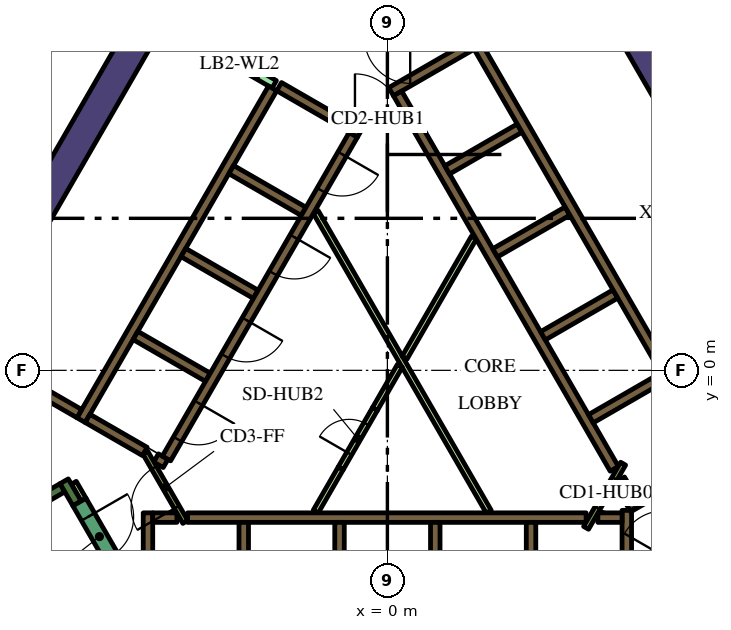
"""IFC4 building model, lengths in metres.
Left out: names, types, materials, properties, quantities, classifications, styles, units other than length and angle.
Written with IfcOpenShell. Run it as: python <this file> out.ifc"""

import sys

from ifc_helpers import new_model, si_unit, direction, frame, frame_2d, origin, place, context, subcontext, project, spatial, polyline, rectangle, outline, extrude, element, fill, save


model = new_model("IFC4")
c1 = context("Model", 3, precision=1e-05, world=origin(), true_north=direction((0.0, 1.0)))
c2 = subcontext(c1, "Body", "Model", "MODEL_VIEW")
j1 = project(units=[si_unit("LENGTHUNIT", "METRE"), si_unit("PLANEANGLEUNIT", "RADIAN")], contexts=[c1])
p1 = place(None, origin())
s1 = spatial("IfcSite", under=j1, at=p1, CompositionType="ELEMENT")
p2 = place(p1, origin())
s2 = spatial("IfcBuilding", under=s1, at=p2, CompositionType="ELEMENT")
p3 = place(p2, frame((0.0, 0.0, 192.0)))
s3 = spatial("IfcBuildingStorey", under=s2, at=p3, CompositionType="ELEMENT", Elevation=192.0)
p4 = place(p3, frame((8.279, 5.761, 0.0), z_axis=(0.0, 0.0, 1.0), x_axis=(-0.500010359015, 0.866019422922, 0.0)))
e1 = element("IfcWall", 1, at=p4, inside=s3, PredefinedType="SOLIDWALL", context=c2, shape_type="SweptSolid", body=[
    extrude(rectangle(XDim=12.528, YDim=0.8, at=frame_2d((6.264, 0.0))), origin(), (0.0, 0.0, 1.0), 4.2),
])
p5 = place(p3, frame((-4.321, 12.616, 0.0), z_axis=(0.0, 0.0, 1.0), x_axis=(-0.500009809857, -0.866019739987, 0.0)))
e2 = element("IfcWall", 2, at=p5, inside=s3, PredefinedType="SOLIDWALL", context=c2, shape_type="SweptSolid", body=[
    extrude(rectangle(XDim=16.695, YDim=0.8, at=frame_2d((8.347, 0.0))), origin(), (0.0, 0.0, 1.0), 4.2),
])
p6 = place(p3, frame((-14.44, -6.49, 0.0), z_axis=(0.0, 0.0, 1.0), x_axis=(0.866022966069, 0.500004222222, 0.0)))
e3 = element("IfcWall", 3, at=p6, inside=s3, PredefinedType="SOLIDWALL", context=c2, shape_type="SweptSolid", body=[
    extrude(rectangle(XDim=6.8, YDim=0.25, at=frame_2d((3.4, 0.0))), origin(), (0.0, 0.0, 1.0), 4.2),
])
p7 = place(p3, frame((-8.168, -3.503, 0.0), z_axis=(0.0, 0.0, 1.0), x_axis=(-0.499952099219, 0.866053057547, 0.0)))
e4 = element("IfcWall", 4, at=p7, inside=s3, PredefinedType="SOLIDWALL", context=c2, shape_type="SweptSolid", body=[
    extrude(rectangle(XDim=0.675, YDim=0.25, at=frame_2d((0.337, 0.0))), origin(), (0.0, 0.0, 1.0), 4.2),
])
p8 = place(p3, frame((-5.259, -3.875, 0.0), z_axis=(0.0, 0.0, 1.0), x_axis=(1.0, 0.0, 0.0)))
e5 = element("IfcWall", 5, at=p8, inside=s3, PredefinedType="SOLIDWALL", context=c2, shape_type="SweptSolid", body=[
    extrude(rectangle(XDim=10.489, YDim=0.25, at=frame_2d((5.244, 0.0))), origin(), (0.0, 0.0, 1.0), 4.2),
])
for number, where, z_axis, x_axis in (
    (6, (3.78, -4.0, 0.0), (0.0, 0.0, 1.0), (0.0, -1.0, 0.0)),
    (7, (1.26, -4.0, 0.0), (0.0, 0.0, 1.0), (0.0, -1.0, 0.0)),
    (8, (-1.26, -4.0, 0.0), (0.0, 0.0, 1.0), (0.0, -1.0, 0.0)),
    (9, (-3.78, -4.0, 0.0), (0.0, 0.0, 1.0), (0.0, -1.0, 0.0)),
):
    element("IfcWall", number, at=place(p3, frame(where, z_axis=z_axis, x_axis=x_axis)), inside=s3, PredefinedType="SOLIDWALL", context=c2, shape_type="SweptSolid", body=[
        extrude(rectangle(XDim=2.2, YDim=0.25, at=frame_2d((1.1, 0.0))), origin(), (0.0, 0.0, 1.0), 4.2),
    ])
p9 = place(p3, frame((-6.3, -7.125, 0.0), z_axis=(0.0, 0.0, 1.0), x_axis=(0.0, 1.0, 0.0)))
e10 = element("IfcWall", 10, at=p9, inside=s3, PredefinedType="SOLIDWALL", context=c2, shape_type="SweptSolid", body=[
    extrude(rectangle(XDim=3.375, YDim=0.25, at=frame_2d((1.687, 0.0))), origin(), (0.0, 0.0, 1.0), 4.2),
])
p10 = place(p3, frame((-6.175, -3.875, 0.0), z_axis=(0.0, 0.0, 1.0), x_axis=(1.0, 0.0, 0.0)))
e11 = element("IfcWall", 11, at=p10, inside=s3, PredefinedType="SOLIDWALL", context=c2, shape_type="SweptSolid", body=[
    extrude(rectangle(XDim=0.637, YDim=0.25, at=frame_2d((0.318, 0.0))), origin(), (0.0, 0.0, 1.0), 4.2),
])
p11 = place(p3, frame((6.3, -7.24, 0.0), z_axis=(0.0, 0.0, 1.0), x_axis=(0.0, 1.0, 0.0)))
e12 = element("IfcWall", 12, at=p11, inside=s3, PredefinedType="SOLIDWALL", context=c2, shape_type="SweptSolid", body=[
    extrude(rectangle(XDim=3.556, YDim=0.25, at=frame_2d((1.778, 0.0))), origin(), (0.0, 0.0, 1.0), 4.2),
])
p12 = place(p3, frame((5.538, -3.875, 0.0), z_axis=(0.0, 0.0, 1.0), x_axis=(1.0, 0.0, 0.0)))
e13 = element("IfcWall", 13, at=p12, inside=s3, PredefinedType="SOLIDWALL", context=c2, shape_type="SweptSolid", body=[
    extrude(rectangle(XDim=0.637, YDim=0.25, at=frame_2d((0.318, 0.0))), origin(), (0.0, 0.0, 1.0), 4.2),
])
p13 = place(p3, frame((9.19, -1.969, 0.0), z_axis=(0.0, 0.0, 1.0), x_axis=(-0.866057109641, -0.499945079824, 0.0)))
e14 = element("IfcWall", 14, at=p13, inside=s3, PredefinedType="SOLIDWALL", context=c2, shape_type="SweptSolid", body=[
    extrude(rectangle(XDim=3.291, YDim=0.25, at=frame_2d((1.646, 0.0))), origin(), (0.0, 0.0, 1.0), 4.2),
])
p14 = place(p3, frame((6.13, -2.867, 0.0), z_axis=(0.0, 0.0, 1.0), x_axis=(0.500160776593, -0.865932559475, 0.0)))
e15 = element("IfcWall", 15, at=p14, inside=s3, PredefinedType="SOLIDWALL", context=c2, shape_type="SweptSolid", body=[
    extrude(rectangle(XDim=0.627, YDim=0.25, at=frame_2d((0.313, 0.0))), origin(), (0.0, 0.0, 1.0), 4.2),
])
p15 = place(p3, frame((3.1, 9.064, 0.0), z_axis=(0.0, 0.0, 1.0), x_axis=(-0.866033137035, -0.499986605379, 0.0)))
e16 = element("IfcWall", 16, at=p15, inside=s3, PredefinedType="SOLIDWALL", context=c2, shape_type="SweptSolid", body=[
    extrude(rectangle(XDim=3.467, YDim=0.25, at=frame_2d((1.733, 0.0))), origin(), (0.0, 0.0, 1.0), 4.2),
])
p16 = place(p3, frame((0.268, 7.285, 0.0), z_axis=(0.0, 0.0, 1.0), x_axis=(0.500098681536, -0.865968422476, 0.0)))
e17 = element("IfcWall", 17, at=p16, inside=s3, PredefinedType="SOLIDWALL", context=c2, shape_type="SweptSolid", body=[
    extrude(rectangle(XDim=0.636, YDim=0.25, at=frame_2d((0.318, 0.0))), origin(), (0.0, 0.0, 1.0), 4.2),
])
p17 = place(p3, frame((5.97, -2.591, 0.0), z_axis=(0.0, 0.0, 1.0), x_axis=(-0.499994469932, 0.866028596547, 0.0)))
e18 = element("IfcWall", 18, at=p17, inside=s3, PredefinedType="SOLIDWALL", context=c2, shape_type="SweptSolid", body=[
    extrude(rectangle(XDim=10.488, YDim=0.25, at=frame_2d((5.244, 0.0))), origin(), (0.0, 0.0, 1.0), 4.2),
])
p18 = place(p3, frame((1.574, 5.274, 0.0), z_axis=(0.0, 0.0, 1.0), x_axis=(0.866028486751, 0.499994660107, 0.0)))
e19 = element("IfcWall", 19, at=p18, inside=s3, PredefinedType="SOLIDWALL", context=c2, shape_type="SweptSolid", body=[
    extrude(rectangle(XDim=2.2, YDim=0.25, at=frame_2d((1.1, 0.0))), origin(), (0.0, 0.0, 1.0), 4.2),
])
for number, where, z_axis, x_axis in (
    (20, (2.834, 3.091, 0.0), (0.0, 0.0, 1.0), (0.866, 0.5, 0.0)),
    (21, (4.094, 0.909, 0.0), (0.0, 0.0, 1.0), (0.866, 0.5, 0.0)),
    (22, (5.354, -1.274, 0.0), (0.0, 0.0, 1.0), (0.866, 0.5, 0.0)),
):
    element("IfcWall", number, at=place(p3, frame(where, z_axis=z_axis, x_axis=x_axis)), inside=s3, PredefinedType="SOLIDWALL", context=c2, shape_type="SweptSolid", body=[
        extrude(rectangle(XDim=2.2, YDim=0.25, at=frame_2d((1.1, 0.0))), origin(), (0.0, 0.0, 1.0), 4.2),
    ])
p19 = place(p3, frame((-3.02, 7.419, 0.0), z_axis=(0.0, 0.0, 1.0), x_axis=(-0.500022956343, -0.866012149528, 0.0)))
e23 = element("IfcWall", 23, at=p19, inside=s3, PredefinedType="SOLIDWALL", context=c2, shape_type="SweptSolid", body=[
    extrude(rectangle(XDim=10.08, YDim=0.25, at=frame_2d((5.04, 0.0))), origin(), (0.0, 0.0, 1.0), 4.2),
])
p20 = place(p3, origin())
e24 = element("IfcWall", 24, at=p20, inside=s3, PredefinedType="SOLIDWALL", context=c2, shape_type="SweptSolid", body=[
    extrude(outline(polyline([(-2.912, 7.356), (-2.787, 7.573), (-1.232, 6.675), (-1.303, 6.675), (-1.304, 6.675), (-1.304, 6.675), (-1.304, 6.525), (-1.304, 6.525), (-1.303, 6.525), (-0.971, 6.525), (-0.665, 6.348), (-0.79, 6.132), (-1.007, 6.257), (-1.007, 6.257), (-2.912, 7.356)])), origin(), (0.0, 0.0, 1.0), 4.2),
])
for number, where, z_axis, x_axis in (
    (25, (-2.204, 4.182, 0.0), (0.0, 0.0, 1.0), (-0.866, 0.5, 0.0)),
    (26, (-5.369, 3.1, 0.0), (0.0, 0.0, 1.0), (0.866, -0.5, 0.0)),
    (27, (-4.724, -0.182, 0.0), (0.0, 0.0, 1.0), (-0.866, 0.5, 0.0)),
):
    element("IfcWall", number, at=place(p3, frame(where, z_axis=z_axis, x_axis=x_axis)), inside=s3, PredefinedType="SOLIDWALL", context=c2, shape_type="SweptSolid", body=[
        extrude(rectangle(XDim=2.2, YDim=0.25, at=frame_2d((1.1, 0.0))), origin(), (0.0, 0.0, 1.0), 4.2),
    ])
p21 = place(p3, frame((-6.088, -2.305, 0.0), z_axis=(0.0, 0.0, 1.0), x_axis=(0.866059450854, -0.499941024108, 0.0)))
e28 = element("IfcWall", 28, at=p21, inside=s3, PredefinedType="SOLIDWALL", context=c2, shape_type="SweptSolid", body=[
    extrude(rectangle(XDim=0.29, YDim=0.25, at=frame_2d((0.145, 0.0))), origin(), (0.0, 0.0, 1.0), 4.2),
])
p22 = place(p3, frame((-7.889, -1.265, 0.0), z_axis=(0.0, 0.0, 1.0), x_axis=(0.865986741702, -0.500066958712, 0.0)))
e29 = element("IfcWall", 29, at=p22, inside=s3, PredefinedType="SOLIDWALL", context=c2, shape_type="SweptSolid", body=[
    extrude(rectangle(XDim=1.738, YDim=0.25, at=frame_2d((0.869, 0.0))), origin(), (0.0, 0.0, 1.0), 4.2),
])
p23 = place(p3, frame((-8.106, -1.14, 0.0), z_axis=(0.0, 0.0, 1.0), x_axis=(-0.866008981251, 0.500028443584, 0.0)))
e30 = element("IfcWall", 30, at=p23, inside=s3, PredefinedType="SOLIDWALL", context=c2, shape_type="SweptSolid", body=[
    extrude(rectangle(XDim=3.2, YDim=0.25, at=frame_2d((1.6, 0.0))), origin(), (0.0, 0.0, 1.0), 4.2),
])
p24 = place(p3, frame((-8.252, -2.958, 0.0), z_axis=(0.0, 0.0, 1.0), x_axis=(0.500174715838, -0.865924508047, 0.0)))
e31 = element("IfcWall", 31, at=p24, inside=s3, PredefinedType="PARTITIONING", context=c2, shape_type="SweptSolid", body=[
    extrude(rectangle(XDim=0.514, YDim=0.15, at=frame_2d((0.257, 0.0))), origin(), (0.0, 0.0, 1.0), 3.1),
])
p25 = place(p3, frame((-1.887, 4.168, 0.0), z_axis=(0.0, 0.0, 1.0), x_axis=(0.499997069472, -0.866027095719, 0.0)))
e32 = element("IfcWall", 32, at=p25, inside=s3, PredefinedType="PARTITIONING", context=c2, shape_type="SweptSolid", body=[
    extrude(rectangle(XDim=9.106, YDim=0.15, at=frame_2d((4.553, 0.0))), origin(), (0.0, 0.0, 1.0), 3.1),
])
p26 = place(p3, frame((-0.329, -1.021, 0.0), z_axis=(0.0, 0.0, 1.0), x_axis=(0.500033191285, 0.866006239939, 0.0)))
e33 = element("IfcWall", 33, at=p26, inside=s3, PredefinedType="PARTITIONING", context=c2, shape_type="SweptSolid", body=[
    extrude(rectangle(XDim=1.315, YDim=0.15, at=frame_2d((0.657, 0.0))), origin(), (0.0, 0.0, 1.0), 3.1),
])
p27 = place(p3, frame((2.277, 3.493, 0.0), z_axis=(0.0, 0.0, 1.0), x_axis=(-0.499994550825, -0.866028549844, 0.0)))
e34 = element("IfcWall", 34, at=p27, inside=s3, PredefinedType="PARTITIONING", context=c2, shape_type="SweptSolid", body=[
    extrude(rectangle(XDim=3.65, YDim=0.15, at=frame_2d((1.825, 0.0))), origin(), (0.0, 0.0, 1.0), 3.1),
])
p28 = place(p3, frame((-1.887, -3.718, 0.0), z_axis=(0.0, 0.0, 1.0), x_axis=(0.500033191285, 0.866006239939, 0.0)))
e35 = element("IfcWall", 35, at=p28, inside=s3, PredefinedType="PARTITIONING", context=c2, shape_type="SweptSolid", body=[
    extrude(rectangle(XDim=1.315, YDim=0.15, at=frame_2d((0.657, 0.0))), origin(), (0.0, 0.0, 1.0), 3.1),
])
p29 = place(p3, frame((8.565, -2.185, 0.0), z_axis=(0.0, 0.0, 1.0), x_axis=(-0.499997954832, 0.866026584559, 0.0)))
e36 = element("IfcWall", 36, at=p29, inside=s3, PredefinedType="SOLIDWALL", context=c2, shape_type="SweptSolid", body=[
    extrude(rectangle(XDim=12.35, YDim=0.25, at=frame_2d((6.175, 0.0))), origin(), (0.0, 0.0, 1.0), 4.2),
])
p30 = place(p29, frame((0.585, 0.0, 0.0)))
e37 = element("IfcOpeningElement", 37, at=p30, cuts=e36, PredefinedType="OPENING", context=c2, shape_type="SweptSolid", body=[
    extrude(rectangle(XDim=1.1, YDim=2.1, at=frame_2d((0.55, 1.05))), frame((0.0, 0.135, 0.0), z_axis=(0.0, -1.0, 0.0), x_axis=(1.0, 0.0, 0.0)), (0.0, 0.0, 1.0), 0.27),
])
p31 = place(p3, frame((-0.898, 6.194, 0.0), z_axis=(0.0, 0.0, 1.0), x_axis=(-0.499996202215, -0.866027596426, 0.0)))
e38 = element("IfcWall", 38, at=p31, inside=s3, PredefinedType="SOLIDWALL", context=c2, shape_type="SweptSolid", body=[
    extrude(rectangle(XDim=9.83, YDim=0.25, at=frame_2d((4.915, 0.0))), origin(), (0.0, 0.0, 1.0), 4.2),
])
p32 = place(p31, frame((0.585, 0.0, 0.0)))
e39 = element("IfcOpeningElement", 39, at=p32, cuts=e38, PredefinedType="OPENING", context=c2, shape_type="SweptSolid", body=[
    extrude(rectangle(XDim=1.1, YDim=2.1, at=frame_2d((0.55, 1.05))), frame((0.0, 0.135, 0.0), z_axis=(0.0, -1.0, 0.0), x_axis=(1.0, 0.0, 0.0)), (0.0, 0.0, 1.0), 0.27),
])
p33 = place(p31, frame((3.105, 0.0, 0.0)))
e40 = element("IfcOpeningElement", 40, at=p33, cuts=e38, PredefinedType="OPENING", context=c2, shape_type="SweptSolid", body=[
    extrude(rectangle(XDim=1.1, YDim=2.1, at=frame_2d((0.55, 1.05))), frame((0.0, 0.135, 0.0), z_axis=(0.0, -1.0, 0.0), x_axis=(1.0, 0.0, 0.0)), (0.0, 0.0, 1.0), 0.27),
])
p34 = place(p31, frame((5.625, 0.0, 0.0)))
e41 = element("IfcOpeningElement", 41, at=p34, cuts=e38, PredefinedType="OPENING", context=c2, shape_type="SweptSolid", body=[
    extrude(rectangle(XDim=1.1, YDim=2.1, at=frame_2d((0.55, 1.05))), frame((0.0, 0.135, 0.0), z_axis=(0.0, -1.0, 0.0), x_axis=(1.0, 0.0, 0.0)), (0.0, 0.0, 1.0), 0.27),
])
p35 = place(p31, frame((8.145, 0.0, 0.0)))
e42 = element("IfcOpeningElement", 42, at=p35, cuts=e38, PredefinedType="OPENING", context=c2, shape_type="SweptSolid", body=[
    extrude(rectangle(XDim=1.1, YDim=2.1, at=frame_2d((0.55, 1.05))), frame((0.0, 0.135, 0.0), z_axis=(0.0, -1.0, 0.0), x_axis=(1.0, 0.0, 0.0)), (0.0, 0.0, 1.0), 0.27),
])
p36 = place(p3, frame((7.053, -5.284, 0.0), z_axis=(0.0, 0.0, 1.0), x_axis=(0.500078061341, 0.865980330357, 0.0)))
e43 = element("IfcWall", 43, at=p36, inside=s3, PredefinedType="SOLIDWALL", context=c2, shape_type="SweptSolid", body=[
    extrude(rectangle(XDim=2.1, YDim=0.4, at=frame_2d((1.05, 0.0))), origin(), (0.0, 0.0, 1.0), 4.2),
])
p37 = place(p36, frame((0.45, 0.0, 0.0)))
e44 = element("IfcOpeningElement", 44, at=p37, cuts=e43, PredefinedType="OPENING", context=c2, shape_type="SweptSolid", body=[
    extrude(rectangle(XDim=1.2, YDim=2.1, at=frame_2d((0.6, 1.05))), frame((0.0, 0.21, 0.0), z_axis=(0.0, -1.0, 0.0), x_axis=(1.0, 0.0, 0.0)), (0.0, 0.0, 1.0), 0.42),
])
p38 = place(p3, frame((-8.103, -3.466, 0.0), z_axis=(0.0, 0.0, 1.0), x_axis=(0.500078061341, -0.865980330357, 0.0)))
e45 = element("IfcWall", 45, at=p38, inside=s3, PredefinedType="SOLIDWALL", context=c2, shape_type="SweptSolid", body=[
    extrude(rectangle(XDim=2.1, YDim=0.4, at=frame_2d((1.05, 0.0))), origin(), (0.0, 0.0, 1.0), 4.2),
])
p39 = place(p38, frame((0.45, 0.0, 0.0)))
e46 = element("IfcOpeningElement", 46, at=p39, cuts=e45, PredefinedType="OPENING", context=c2, shape_type="SweptSolid", body=[
    extrude(rectangle(XDim=1.2, YDim=2.1, at=frame_2d((0.6, 1.05))), frame((0.0, 0.21, 0.0), z_axis=(0.0, -1.0, 0.0), x_axis=(1.0, 0.0, 0.0)), (0.0, 0.0, 1.0), 0.42),
])
p40 = place(p3, frame((6.203, -2.456, 0.0), z_axis=(0.0, 0.0, 1.0), x_axis=(-0.500043961785, -0.866000020948, 0.0)))
e47 = element("IfcWall", 47, at=p40, inside=s3, PredefinedType="PARTITIONING", context=c2, shape_type="SweptSolid", body=[
    extrude(rectangle(XDim=1.95, YDim=0.15, at=frame_2d((0.975, 0.0))), origin(), (0.0, 0.0, 1.0), 4.2),
])
p41 = place(p40, frame((0.45, 0.0, 0.0)))
e48 = element("IfcOpeningElement", 48, at=p41, cuts=e47, PredefinedType="OPENING", context=c2, shape_type="SweptSolid", body=[
    extrude(rectangle(XDim=0.9, YDim=2.1, at=frame_2d((0.45, 1.05))), frame((0.0, 0.085, 0.0), z_axis=(0.0, -1.0, 0.0), x_axis=(1.0, 0.0, 0.0)), (0.0, 0.0, 1.0), 0.17),
])
p42 = place(p3, frame((-1.303, 6.6, 0.0), z_axis=(0.0, 0.0, 1.0), x_axis=(1.0, 0.0, 0.0)))
e49 = element("IfcWall", 49, at=p42, inside=s3, PredefinedType="PARTITIONING", context=c2, shape_type="SweptSolid", body=[
    extrude(rectangle(XDim=2.1, YDim=0.15, at=frame_2d((1.05, 0.0))), origin(), (0.0, 0.0, 1.0), 4.2),
])
p43 = place(p42, frame((0.45, 0.0, 0.0)))
e50 = element("IfcOpeningElement", 50, at=p43, cuts=e49, PredefinedType="OPENING", context=c2, shape_type="SweptSolid", body=[
    extrude(rectangle(XDim=1.2, YDim=2.1, at=frame_2d((0.6, 1.05))), frame((0.0, 0.085, 0.0), z_axis=(0.0, -1.0, 0.0), x_axis=(1.0, 0.0, 0.0)), (0.0, 0.0, 1.0), 0.17),
])
p44 = place(p3, frame((-5.317, -3.99, 0.0), z_axis=(0.0, 0.0, 1.0), x_axis=(-0.500027713859, 0.866009402589, 0.0)))
e51 = element("IfcWall", 51, at=p44, inside=s3, PredefinedType="PARTITIONING", context=c2, shape_type="SweptSolid", body=[
    extrude(rectangle(XDim=2.1, YDim=0.15, at=frame_2d((1.05, 0.0))), origin(), (0.0, 0.0, 1.0), 4.2),
])
p45 = place(p44, frame((0.45, 0.0, 0.0)))
e52 = element("IfcOpeningElement", 52, at=p45, cuts=e51, PredefinedType="OPENING", context=c2, shape_type="SweptSolid", body=[
    extrude(rectangle(XDim=1.2, YDim=2.1, at=frame_2d((0.6, 1.05))), frame((0.0, 0.085, 0.0), z_axis=(0.0, -1.0, 0.0), x_axis=(1.0, 0.0, 0.0)), (0.0, 0.0, 1.0), 0.17),
])
p46 = place(p3, frame((-4.796, 8.575, 0.0), z_axis=(0.0, 0.0, 1.0), x_axis=(0.866009402589, -0.500027713859, 0.0)))
e53 = element("IfcWall", 53, at=p46, inside=s3, PredefinedType="PARTITIONING", context=c2, shape_type="SweptSolid", body=[
    extrude(rectangle(XDim=2.1, YDim=0.226, at=frame_2d((1.05, 0.0))), origin(), (0.0, 0.0, 1.0), 3.1),
])
p47 = place(p46, frame((0.45, 0.0, 0.0)))
e54 = element("IfcOpeningElement", 54, at=p47, cuts=e53, PredefinedType="OPENING", context=c2, shape_type="SweptSolid", body=[
    extrude(rectangle(XDim=1.2, YDim=2.1, at=frame_2d((0.6, 1.05))), frame((0.0, 0.123, 0.0), z_axis=(0.0, -1.0, 0.0), x_axis=(1.0, 0.0, 0.0)), (0.0, 0.0, 1.0), 0.246),
])
p48 = place(p3, frame((-1.229, -2.579, 0.0), z_axis=(0.0, 0.0, 1.0), x_axis=(0.500062916607, 0.865989075817, 0.0)))
e55 = element("IfcWall", 55, at=p48, inside=s3, PredefinedType="PARTITIONING", context=c2, shape_type="SweptSolid", body=[
    extrude(rectangle(XDim=1.8, YDim=0.15, at=frame_2d((0.9, 0.0))), origin(), (0.0, 0.0, 1.0), 3.1),
])
p49 = place(p48, frame((0.45, 0.0, 0.0)))
e56 = element("IfcOpeningElement", 56, at=p49, cuts=e55, PredefinedType="OPENING", context=c2, shape_type="SweptSolid", body=[
    extrude(rectangle(XDim=0.9, YDim=2.1, at=frame_2d((0.45, 1.05))), frame((0.0, 0.085, 0.0), z_axis=(0.0, -1.0, 0.0), x_axis=(1.0, 0.0, 0.0)), (0.0, 0.0, 1.0), 0.17),
])
p50 = place(p32, origin())
e57 = element("IfcDoor", 57, at=p50, inside=s3, OperationType="DOUBLE_DOOR_SLIDING", PredefinedType="DOOR", context=c2, shape_type="SweptSolid", body=[
    extrude(rectangle(XDim=1.1, YDim=2.1, at=frame_2d((0.55, 1.05))), frame((0.0, 0.025, 0.0), z_axis=(0.0, -1.0, 0.0), x_axis=(1.0, 0.0, 0.0)), (0.0, 0.0, 1.0), 0.05),
])
fill(e39, e57)
p51 = place(p33, origin())
e58 = element("IfcDoor", 58, at=p51, inside=s3, OperationType="DOUBLE_DOOR_SLIDING", PredefinedType="DOOR", context=c2, shape_type="SweptSolid", body=[
    extrude(rectangle(XDim=1.1, YDim=2.1, at=frame_2d((0.55, 1.05))), frame((0.0, 0.025, 0.0), z_axis=(0.0, -1.0, 0.0), x_axis=(1.0, 0.0, 0.0)), (0.0, 0.0, 1.0), 0.05),
])
fill(e40, e58)
p52 = place(p34, origin())
e59 = element("IfcDoor", 59, at=p52, inside=s3, OperationType="DOUBLE_DOOR_SLIDING", PredefinedType="DOOR", context=c2, shape_type="SweptSolid", body=[
    extrude(rectangle(XDim=1.1, YDim=2.1, at=frame_2d((0.55, 1.05))), frame((0.0, 0.025, 0.0), z_axis=(0.0, -1.0, 0.0), x_axis=(1.0, 0.0, 0.0)), (0.0, 0.0, 1.0), 0.05),
])
fill(e41, e59)
p53 = place(p35, origin())
e60 = element("IfcDoor", 60, at=p53, inside=s3, OperationType="DOUBLE_DOOR_SLIDING", PredefinedType="DOOR", context=c2, shape_type="SweptSolid", body=[
    extrude(rectangle(XDim=1.1, YDim=2.1, at=frame_2d((0.55, 1.05))), frame((0.0, 0.025, 0.0), z_axis=(0.0, -1.0, 0.0), x_axis=(1.0, 0.0, 0.0)), (0.0, 0.0, 1.0), 0.05),
])
fill(e42, e60)
p54 = place(p39, origin())
e61 = element("IfcDoor", 61, at=p54, inside=s3, OperationType="SINGLE_SWING_LEFT", PredefinedType="DOOR", context=c2, shape_type="SweptSolid", body=[
    extrude(rectangle(XDim=1.2, YDim=2.1, at=frame_2d((0.6, 1.05))), frame((0.0, 0.025, 0.0), z_axis=(0.0, -1.0, 0.0), x_axis=(1.0, 0.0, 0.0)), (0.0, 0.0, 1.0), 0.05),
])
fill(e46, e61)
p55 = place(p41, origin())
e62 = element("IfcDoor", 62, at=p55, inside=s3, OperationType="SINGLE_SWING_LEFT", PredefinedType="DOOR", context=c2, shape_type="SweptSolid", body=[
    extrude(rectangle(XDim=0.9, YDim=2.1, at=frame_2d((0.45, 1.05))), frame((0.0, 0.025, 0.0), z_axis=(0.0, -1.0, 0.0), x_axis=(1.0, 0.0, 0.0)), (0.0, 0.0, 1.0), 0.05),
])
fill(e48, e62)
p56 = place(p43, origin())
e63 = element("IfcDoor", 63, at=p56, inside=s3, OperationType="SINGLE_SWING_LEFT", PredefinedType="DOOR", context=c2, shape_type="SweptSolid", body=[
    extrude(rectangle(XDim=1.2, YDim=2.1, at=frame_2d((0.6, 1.05))), frame((0.0, 0.025, 0.0), z_axis=(0.0, -1.0, 0.0), x_axis=(1.0, 0.0, 0.0)), (0.0, 0.0, 1.0), 0.05),
])
fill(e50, e63)
p57 = place(p45, origin())
e64 = element("IfcDoor", 64, at=p57, inside=s3, OperationType="SINGLE_SWING_LEFT", PredefinedType="DOOR", context=c2, shape_type="SweptSolid", body=[
    extrude(rectangle(XDim=1.2, YDim=2.1, at=frame_2d((0.6, 1.05))), frame((0.0, 0.025, 0.0), z_axis=(0.0, -1.0, 0.0), x_axis=(1.0, 0.0, 0.0)), (0.0, 0.0, 1.0), 0.05),
])
fill(e52, e64)
p58 = place(p47, origin())
e65 = element("IfcDoor", 65, at=p58, inside=s3, OperationType="SINGLE_SWING_LEFT", PredefinedType="DOOR", context=c2, shape_type="SweptSolid", body=[
    extrude(rectangle(XDim=1.2, YDim=2.1, at=frame_2d((0.6, 1.05))), frame((0.0, 0.025, 0.0), z_axis=(0.0, -1.0, 0.0), x_axis=(1.0, 0.0, 0.0)), (0.0, 0.0, 1.0), 0.05),
])
fill(e54, e65)
p59 = place(p49, origin())
e66 = element("IfcDoor", 66, at=p59, inside=s3, OperationType="SINGLE_SWING_LEFT", PredefinedType="DOOR", context=c2, shape_type="SweptSolid", body=[
    extrude(rectangle(XDim=0.9, YDim=2.1, at=frame_2d((0.45, 1.05))), frame((0.0, 0.025, 0.0), z_axis=(0.0, -1.0, 0.0), x_axis=(1.0, 0.0, 0.0)), (0.0, 0.0, 1.0), 0.05),
])
fill(e56, e66)
save(model, sys.argv[1])
